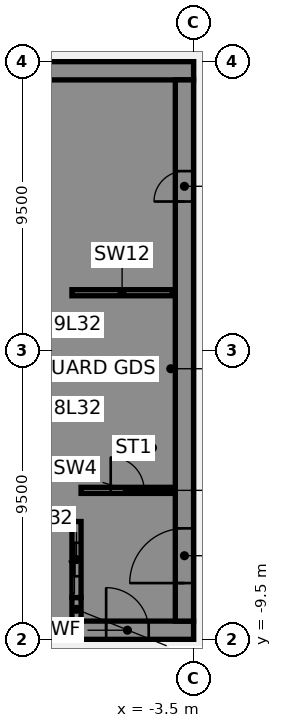
"""IFC4 building model, lengths in metres.
Left out: names, types, materials, properties, quantities, classifications, styles, units other than length and angle.
Written with IfcOpenShell. Run it as: python <this file> out.ifc"""

import sys

from ifc_helpers import new_model, si_unit, direction, frame, frame_2d, origin, place, context, subcontext, project, spatial, polyline, rectangle, outline, extrude, element, fill, save


model = new_model("IFC4")
c1 = context("Model", 3, precision=1e-05, world=origin(), true_north=direction((0.0, 1.0)))
c2 = subcontext(c1, "Body", "Model", "MODEL_VIEW")
j1 = project(units=[si_unit("LENGTHUNIT", "METRE"), si_unit("PLANEANGLEUNIT", "RADIAN")], contexts=[c1])
p1 = place(None, origin())
s1 = spatial("IfcSite", under=j1, at=p1, CompositionType="ELEMENT")
p2 = place(p1, origin())
s2 = spatial("IfcBuilding", under=s1, at=p2, CompositionType="ELEMENT")
p3 = place(p2, frame((0.0, 0.0, 133.0)))
s3 = spatial("IfcBuildingStorey", under=s2, at=p3, CompositionType="ELEMENT", Elevation=133.0)
p4 = place(p3, frame((-16.5, -9.2, 0.0), z_axis=(0.0, 0.0, 1.0), x_axis=(1.0, 0.0, 0.0)))
e1 = element("IfcWall", 1, at=p4, inside=s3, PredefinedType="SHEAR", context=c2, shape_type="SweptSolid", body=[
    extrude(rectangle(XDim=13.0, YDim=0.6, at=frame_2d((6.5, 0.0))), origin(), (0.0, 0.0, 1.0), 3.61),
])
p5 = place(p4, frame((4.15, 0.0, 0.0)))
e2 = element("IfcOpeningElement", 2, at=p5, cuts=e1, PredefinedType="OPENING", context=c2, shape_type="SweptSolid", body=[
    extrude(rectangle(XDim=1.4, YDim=2.1, at=frame_2d((0.7, 1.05))), frame((0.0, 0.31, 0.0), z_axis=(0.0, -1.0, 0.0), x_axis=(1.0, 0.0, 0.0)), (0.0, 0.0, 1.0), 0.62),
])
p6 = place(p4, frame((10.125, 0.0, 0.0)))
e3 = element("IfcOpeningElement", 3, at=p6, cuts=e1, PredefinedType="OPENING", context=c2, shape_type="SweptSolid", body=[
    extrude(rectangle(XDim=1.4, YDim=2.1, at=frame_2d((0.7, 1.05))), frame((0.0, 0.31, 0.0), z_axis=(0.0, -1.0, 0.0), x_axis=(1.0, 0.0, 0.0)), (0.0, 0.0, 1.0), 0.62),
])
p7 = place(p3, frame((-16.5, 9.2, 0.0), z_axis=(0.0, 0.0, 1.0), x_axis=(1.0, 0.0, 0.0)))
e4 = element("IfcWall", 4, at=p7, inside=s3, PredefinedType="SHEAR", context=c2, shape_type="SweptSolid", body=[
    extrude(rectangle(XDim=13.0, YDim=0.6, at=frame_2d((6.5, 0.0))), origin(), (0.0, 0.0, 1.0), 3.61),
])
p8 = place(p3, origin())
e5 = element("IfcWall", 5, at=p8, inside=s3, PredefinedType="SHEAR", context=c2, shape_type="SweptSolid", body=[
    extrude(outline(polyline([(-9.8, -5.375), (-9.8, -5.625), (-7.5, -5.625), (-7.2, -5.625), (-7.2, 8.9), (-7.5, 8.9), (-9.8, 8.9), (-9.8, 8.125), (-7.5, 8.125), (-7.5, 5.625), (-9.8, 5.625), (-9.8, 5.375), (-7.5, 5.375), (-7.5, 2.875), (-9.8, 2.875), (-9.8, 2.625), (-7.5, 2.625), (-7.5, 0.125), (-9.8, 0.125), (-9.8, -0.125), (-7.5, -0.125), (-7.5, -2.625), (-9.8, -2.625), (-9.8, -2.875), (-7.5, -2.875), (-7.5, -5.375), (-9.8, -5.375)])), origin(), (0.0, 0.0, 1.0), 3.61),
])
p9 = place(p3, origin())
e6 = element("IfcWall", 6, at=p9, inside=s3, PredefinedType="SHEAR", context=c2, shape_type="SweptSolid", body=[
    extrude(outline(polyline([(-7.5, -8.125), (-9.55, -8.125), (-9.55, -5.625), (-9.8, -5.625), (-9.8, -8.125), (-9.8, -8.9), (-7.5, -8.9), (-7.5, -8.125)])), origin(), (0.0, 0.0, 1.0), 3.61),
])
p10 = place(p3, frame((-7.35, -8.9, 0.0), z_axis=(0.0, 0.0, 1.0), x_axis=(0.0, 1.0, 0.0)))
e7 = element("IfcWall", 7, at=p10, inside=s3, PredefinedType="SHEAR", context=c2, shape_type="SweptSolid", body=[
    extrude(rectangle(XDim=0.775, YDim=0.3, at=frame_2d((0.387, 0.0))), origin(), (0.0, 0.0, 1.0), 3.61),
])
p11 = place(p3, frame((-7.5, 1.9, 0.0), z_axis=(0.0, 0.0, 1.0), x_axis=(1.0, 0.0, 0.0)))
e8 = element("IfcWall", 8, at=p11, inside=s3, PredefinedType="SHEAR", context=c2, shape_type="SweptSolid", body=[
    extrude(rectangle(XDim=3.3, YDim=0.2, at=frame_2d((1.65, 0.0))), origin(), (0.0, 0.0, 1.0), 3.61),
])
p12 = place(p3, frame((-7.35, -8.125, 0.0), z_axis=(0.0, 0.0, 1.0), x_axis=(0.0, 1.0, 0.0)))
e9 = element("IfcWall", 9, at=p12, inside=s3, PredefinedType="SHEAR", context=c2, shape_type="SweptSolid", body=[
    extrude(rectangle(XDim=2.5, YDim=0.3, at=frame_2d((1.25, 0.0))), origin(), (0.0, 0.0, 1.0), 3.61),
])
p13 = place(p12, frame((0.7, 0.0, 0.0)))
e10 = element("IfcOpeningElement", 10, at=p13, cuts=e9, PredefinedType="OPENING", context=c2, shape_type="SweptSolid", body=[
    extrude(rectangle(XDim=1.1, YDim=2.1, at=frame_2d((0.55, 1.05))), frame((0.0, 0.16, 0.0), z_axis=(0.0, -1.0, 0.0), x_axis=(1.0, 0.0, 0.0)), (0.0, 0.0, 1.0), 0.32),
])
p14 = place(p3, frame((-3.8, -8.9, 0.0), z_axis=(0.0, 0.0, 1.0), x_axis=(0.0, 1.0, 0.0)))
e11 = element("IfcWall", 11, at=p14, inside=s3, PredefinedType="SHEAR", context=c2, shape_type="SweptSolid", body=[
    extrude(rectangle(XDim=17.8, YDim=0.6, at=frame_2d((8.9, 0.0))), origin(), (0.0, 0.0, 1.0), 3.61),
])
p15 = place(p14, frame((1.25, 0.0, 0.0)))
e12 = element("IfcOpeningElement", 12, at=p15, cuts=e11, PredefinedType="OPENING", context=c2, shape_type="SweptSolid", body=[
    extrude(rectangle(XDim=1.8, YDim=2.1, at=frame_2d((0.9, 1.05))), frame((0.0, 0.31, 0.0), z_axis=(0.0, -1.0, 0.0), x_axis=(1.0, 0.0, 0.0)), (0.0, 0.0, 1.0), 0.62),
])
p16 = place(p14, frame((13.8, 0.0, 0.0)))
e13 = element("IfcOpeningElement", 13, at=p16, cuts=e11, PredefinedType="OPENING", context=c2, shape_type="SweptSolid", body=[
    extrude(rectangle(XDim=1.0, YDim=2.1, at=frame_2d((0.5, 1.05))), frame((0.0, 0.31, 0.0), z_axis=(0.0, -1.0, 0.0), x_axis=(1.0, 0.0, 0.0)), (0.0, 0.0, 1.0), 0.62),
])
p17 = place(p3, frame((-7.2, -4.6, 0.0), z_axis=(0.0, 0.0, 1.0), x_axis=(1.0, 0.0, 0.0)))
e14 = element("IfcWall", 14, at=p17, inside=s3, PredefinedType="SHEAR", context=c2, shape_type="SweptSolid", body=[
    extrude(rectangle(XDim=3.1, YDim=0.2, at=frame_2d((1.55, 0.0))), origin(), (0.0, 0.0, 1.0), 3.61),
])
p18 = place(p17, frame((0.975, 0.0, 0.0)))
e15 = element("IfcOpeningElement", 15, at=p18, cuts=e14, PredefinedType="OPENING", context=c2, shape_type="SweptSolid", body=[
    extrude(rectangle(XDim=1.1, YDim=2.1, at=frame_2d((0.55, 1.05))), frame((0.0, 0.11, 0.0), z_axis=(0.0, -1.0, 0.0), x_axis=(1.0, 0.0, 0.0)), (0.0, 0.0, 1.0), 0.22),
])
p19 = place(p6, origin())
e16 = element("IfcDoor", 16, at=p19, inside=s3, OperationType="SINGLE_SWING_LEFT", PredefinedType="DOOR", context=c2, shape_type="SweptSolid", body=[
    extrude(rectangle(XDim=1.4, YDim=2.1, at=frame_2d((0.7, 1.05))), frame((0.0, 0.025, 0.0), z_axis=(0.0, -1.0, 0.0), x_axis=(1.0, 0.0, 0.0)), (0.0, 0.0, 1.0), 0.05),
])
fill(e3, e16)
p20 = place(p15, origin())
e17 = element("IfcDoor", 17, at=p20, inside=s3, OperationType="SINGLE_SWING_LEFT", PredefinedType="DOOR", context=c2, shape_type="SweptSolid", body=[
    extrude(rectangle(XDim=1.8, YDim=2.1, at=frame_2d((0.9, 1.05))), frame((0.0, 0.025, 0.0), z_axis=(0.0, -1.0, 0.0), x_axis=(1.0, 0.0, 0.0)), (0.0, 0.0, 1.0), 0.05),
])
fill(e12, e17)
p21 = place(p16, origin())
e18 = element("IfcDoor", 18, at=p21, inside=s3, OperationType="SINGLE_SWING_LEFT", PredefinedType="DOOR", context=c2, shape_type="SweptSolid", body=[
    extrude(rectangle(XDim=1.0, YDim=2.1, at=frame_2d((0.5, 1.05))), frame((0.0, 0.025, 0.0), z_axis=(0.0, -1.0, 0.0), x_axis=(1.0, 0.0, 0.0)), (0.0, 0.0, 1.0), 0.05),
])
fill(e13, e18)
p22 = place(p18, origin())
e19 = element("IfcDoor", 19, at=p22, inside=s3, OperationType="SINGLE_SWING_LEFT", PredefinedType="DOOR", context=c2, shape_type="SweptSolid", body=[
    extrude(rectangle(XDim=1.1, YDim=2.1, at=frame_2d((0.55, 1.05))), frame((0.0, 0.025, 0.0), z_axis=(0.0, -1.0, 0.0), x_axis=(1.0, 0.0, 0.0)), (0.0, 0.0, 1.0), 0.05),
])
fill(e15, e19)
p23 = place(p13, origin())
e20 = element("IfcDoor", 20, at=p23, inside=s3, OperationType="SLIDING_TO_LEFT", PredefinedType="DOOR", context=c2, shape_type="SweptSolid", body=[
    extrude(rectangle(XDim=1.1, YDim=2.1, at=frame_2d((0.55, 1.05))), frame((0.0, 0.025, 0.0), z_axis=(0.0, -1.0, 0.0), x_axis=(1.0, 0.0, 0.0)), (0.0, 0.0, 1.0), 0.05),
])
fill(e10, e20)
save(model, sys.argv[1])
